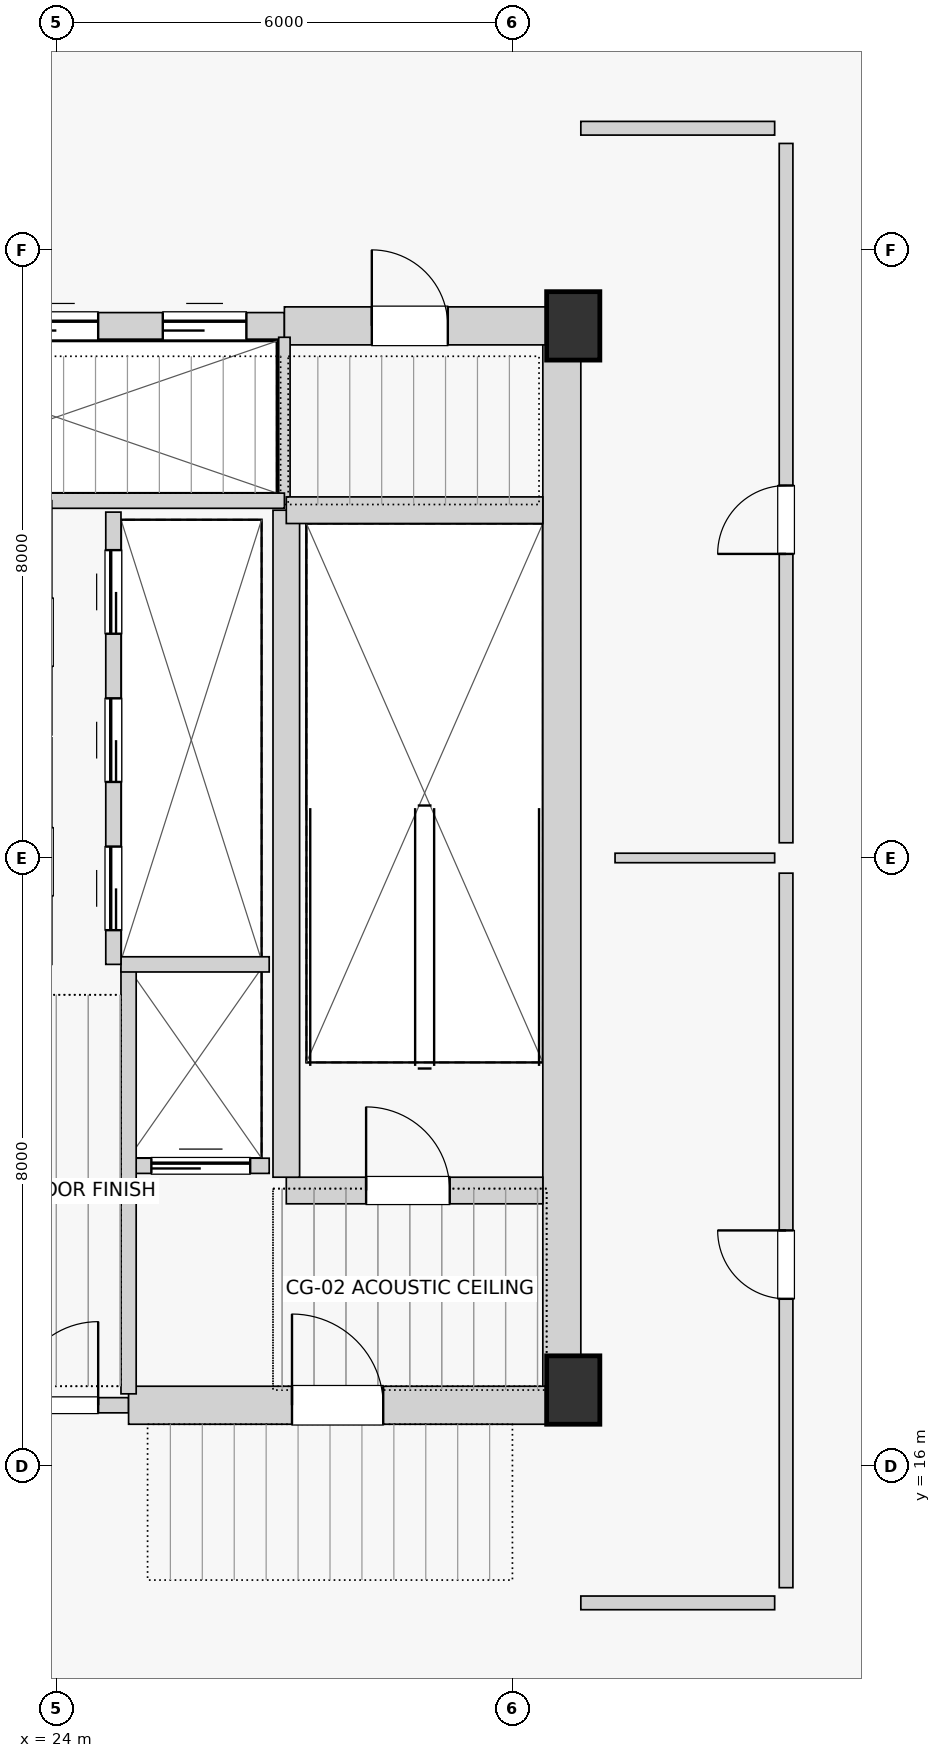
"""IFC4 building model, lengths in metres.
Left out: names, types, materials, properties, quantities, classifications, styles, units other than length and angle.
Written with IfcOpenShell. Run it as: python <this file> out.ifc"""

import sys

from ifc_helpers import new_model, si_unit, direction, frame, frame_2d, origin, origin_2d, place, context, subcontext, project, spatial, rectangle, extrude, source, transform, mapped, element, fill, save


model = new_model("IFC4")
c1 = context("Model", 3, precision=1e-05, world=origin(), true_north=direction((0.0, 1.0)))
c2 = subcontext(c1, "Body", "Model", "MODEL_VIEW")
j1 = project(units=[si_unit("LENGTHUNIT", "METRE"), si_unit("PLANEANGLEUNIT", "RADIAN")], contexts=[c1])
p1 = place(None, origin())
s1 = spatial("IfcSite", under=j1, at=p1, CompositionType="ELEMENT")
p2 = place(p1, origin())
s2 = spatial("IfcBuilding", under=s1, at=p2, CompositionType="ELEMENT")
p3 = place(p2, frame((0.0, 0.0, 174.35)))
s3 = spatial("IfcBuildingStorey", under=s2, at=p3, CompositionType="ELEMENT", Elevation=174.35)
for number, where, z_axis, x_axis in (
    (1, (30.8, 17.0, 0.0), (0.0, 0.0, 1.0), (1.0, 0.0, 0.0)),
    (2, (30.8, 31.0, 0.0), (0.0, 0.0, 1.0), (1.0, 0.0, 0.0)),
):
    element("IfcColumn", number, at=place(p3, frame(where, z_axis=z_axis, x_axis=x_axis)), inside=s3, PredefinedType="PILASTER", context=c2, shape_type="SweptSolid", body=[
        extrude(rectangle(XDim=0.7, YDim=0.9, at=origin_2d()), origin(), (0.0, 0.0, 1.0), 4.5),
    ])
p4 = place(p3, frame((30.65, 16.8, 0.0), z_axis=(0.0, 0.0, 1.0), x_axis=(0.0, 1.0, 0.0)))
e3 = element("IfcWall", 3, at=p4, inside=s3, PredefinedType="SHEAR", context=c2, shape_type="SweptSolid", body=[
    extrude(rectangle(XDim=14.2, YDim=0.5, at=frame_2d((7.1, 0.0))), origin(), (0.0, 0.0, 1.0), 4.265),
])
p5 = place(p3, frame((23.05, 16.8, 0.0), z_axis=(0.0, 0.0, 1.0), x_axis=(1.0, 0.0, 0.0)))
e4 = element("IfcWall", 4, at=p5, inside=s3, PredefinedType="SOLIDWALL", context=c2, shape_type="SweptSolid", body=[
    extrude(rectangle(XDim=1.9, YDim=0.2, at=frame_2d((0.95, 0.0))), origin(), (0.0, 0.0, 1.0), 3.415),
])
p6 = place(p5, frame((0.4, 0.0, 0.0)))
e5 = element("IfcOpeningElement", 5, at=p6, cuts=e4, PredefinedType="OPENING", context=c2, shape_type="SweptSolid", body=[
    extrude(rectangle(XDim=1.1, YDim=2.03, at=frame_2d((0.55, 1.015))), frame((0.0, 0.11, 0.0), z_axis=(0.0, -1.0, 0.0), x_axis=(1.0, 0.0, 0.0)), (0.0, 0.0, 1.0), 0.22),
])
p7 = place(p3, frame((24.95, 16.8, 0.0), z_axis=(0.0, 0.0, 1.0), x_axis=(1.0, 0.0, 0.0)))
e6 = element("IfcWall", 6, at=p7, inside=s3, PredefinedType="SHEAR", context=c2, shape_type="SweptSolid", body=[
    extrude(rectangle(XDim=5.85, YDim=0.5, at=frame_2d((2.925, 0.0))), origin(), (0.0, 0.0, 1.0), 4.265),
])
p8 = place(p7, frame((2.15, 0.0, 0.0)))
e7 = element("IfcOpeningElement", 7, at=p8, cuts=e6, PredefinedType="OPENING", context=c2, shape_type="SweptSolid", body=[
    extrude(rectangle(XDim=1.2, YDim=2.03, at=frame_2d((0.6, 1.015))), frame((0.0, 0.26, 0.0), z_axis=(0.0, -1.0, 0.0), x_axis=(1.0, 0.0, 0.0)), (0.0, 0.0, 1.0), 0.52),
])
p9 = place(p3, frame((21.0, 31.0, 0.0), z_axis=(0.0, 0.0, 1.0), x_axis=(1.0, 0.0, 0.0)))
e8 = element("IfcWall", 8, at=p9, inside=s3, PredefinedType="SHEAR", context=c2, shape_type="SweptSolid", body=[
    extrude(rectangle(XDim=6.0, YDim=0.35, at=frame_2d((3.0, 0.0))), origin(), (0.0, 0.0, 1.0), 4.265),
])
p10 = place(p9, frame((0.5, 0.0, 0.0)))
e9 = element("IfcOpeningElement", 9, at=p10, cuts=e8, PredefinedType="OPENING", context=c2, shape_type="SweptSolid", body=[
    extrude(rectangle(XDim=1.1, YDim=2.08, at=frame_2d((0.55, 1.04))), frame((0.0, 0.185, 0.0), z_axis=(0.0, -1.0, 0.0), x_axis=(1.0, 0.0, 0.0)), (0.0, 0.0, 1.0), 0.37),
])
p11 = place(p9, frame((2.45, 0.0, 0.0)))
e10 = element("IfcOpeningElement", 10, at=p11, cuts=e8, PredefinedType="OPENING", context=c2, shape_type="SweptSolid", body=[
    extrude(rectangle(XDim=1.1, YDim=2.08, at=frame_2d((0.55, 1.04))), frame((0.0, 0.185, 0.0), z_axis=(0.0, -1.0, 0.0), x_axis=(1.0, 0.0, 0.0)), (0.0, 0.0, 1.0), 0.37),
])
p12 = place(p9, frame((4.4, 0.0, 0.0)))
e11 = element("IfcOpeningElement", 11, at=p12, cuts=e8, PredefinedType="OPENING", context=c2, shape_type="SweptSolid", body=[
    extrude(rectangle(XDim=1.1, YDim=2.08, at=frame_2d((0.55, 1.04))), frame((0.0, 0.185, 0.0), z_axis=(0.0, -1.0, 0.0), x_axis=(1.0, 0.0, 0.0)), (0.0, 0.0, 1.0), 0.37),
])
p13 = place(p3, frame((27.0, 31.0, 0.0), z_axis=(0.0, 0.0, 1.0), x_axis=(1.0, 0.0, 0.0)))
e12 = element("IfcWall", 12, at=p13, inside=s3, PredefinedType="SHEAR", context=c2, shape_type="SweptSolid", body=[
    extrude(rectangle(XDim=3.8, YDim=0.5, at=frame_2d((1.9, 0.0))), origin(), (0.0, 0.0, 1.0), 4.265),
])
p14 = place(p13, frame((1.15, 0.0, 0.0)))
e13 = element("IfcOpeningElement", 13, at=p14, cuts=e12, PredefinedType="OPENING", context=c2, shape_type="SweptSolid", body=[
    extrude(rectangle(XDim=1.0, YDim=2.01, at=frame_2d((0.5, 1.005))), frame((0.0, 0.26, 0.0), z_axis=(0.0, -1.0, 0.0), x_axis=(1.0, 0.0, 0.0)), (0.0, 0.0, 1.0), 0.52),
])
p15 = place(p3, frame((27.0, 28.65, 0.0), z_axis=(0.0, 0.0, 1.0), x_axis=(0.0, 1.0, 0.0)))
e14 = element("IfcWall", 14, at=p15, inside=s3, PredefinedType="PARTITIONING", context=c2, shape_type="SweptSolid", body=[
    extrude(rectangle(XDim=2.2, YDim=0.15, at=frame_2d((1.1, 0.0))), origin(), (0.0, 0.0, 1.0), 4.265),
])
p16 = place(p3, frame((24.95, 19.95, 0.0), z_axis=(0.0, 0.0, 1.0), x_axis=(1.0, 0.0, 0.0)))
e15 = element("IfcWall", 15, at=p16, inside=s3, PredefinedType="SOLIDWALL", context=c2, shape_type="SweptSolid", body=[
    extrude(rectangle(XDim=1.85, YDim=0.2, at=frame_2d((0.925, 0.0))), origin(), (0.0, 0.0, 1.0), 4.265),
])
p17 = place(p16, frame((0.3, 0.0, 0.0)))
e16 = element("IfcOpeningElement", 16, at=p17, cuts=e15, PredefinedType="OPENING", context=c2, shape_type="SweptSolid", body=[
    extrude(rectangle(XDim=1.3, YDim=2.25, at=frame_2d((0.65, 1.125))), frame((0.0, 0.11, 0.0), z_axis=(0.0, -1.0, 0.0), x_axis=(1.0, 0.0, 0.0)), (0.0, 0.0, 1.0), 0.22),
])
p18 = place(p3, frame((27.025, 19.625, 0.0), z_axis=(0.0, 0.0, 1.0), x_axis=(1.0, 0.0, 0.0)))
e17 = element("IfcWall", 17, at=p18, inside=s3, PredefinedType="SHEAR", context=c2, shape_type="SweptSolid", body=[
    extrude(rectangle(XDim=3.375, YDim=0.35, at=frame_2d((1.688, 0.0))), origin(), (0.0, 0.0, 1.0), 4.265),
])
p19 = place(p18, frame((1.05, 0.0, 0.0)))
e18 = element("IfcOpeningElement", 18, at=p19, cuts=e17, PredefinedType="OPENING", context=c2, shape_type="SweptSolid", body=[
    extrude(rectangle(XDim=1.1, YDim=2.03, at=frame_2d((0.55, 1.015))), frame((0.0, 0.185, 0.0), z_axis=(0.0, -1.0, 0.0), x_axis=(1.0, 0.0, 0.0)), (0.0, 0.0, 1.0), 0.37),
])
p20 = place(p3, frame((27.025, 19.8, 0.0), z_axis=(0.0, 0.0, 1.0), x_axis=(0.0, 1.0, 0.0)))
e19 = element("IfcWall", 19, at=p20, inside=s3, PredefinedType="SHEAR", context=c2, shape_type="SweptSolid", body=[
    extrude(rectangle(XDim=8.775, YDim=0.35, at=frame_2d((4.387, 0.0))), origin(), (0.0, 0.0, 1.0), 4.265),
])
p21 = place(p3, frame((27.025, 28.575, 0.0), z_axis=(0.0, 0.0, 1.0), x_axis=(1.0, 0.0, 0.0)))
e20 = element("IfcWall", 20, at=p21, inside=s3, PredefinedType="SHEAR", context=c2, shape_type="SweptSolid", body=[
    extrude(rectangle(XDim=3.375, YDim=0.35, at=frame_2d((1.688, 0.0))), origin(), (0.0, 0.0, 1.0), 4.265),
])
p22 = place(p3, frame((24.95, 16.95, 0.0), z_axis=(0.0, 0.0, 1.0), x_axis=(0.0, 1.0, 0.0)))
e21 = element("IfcWall", 21, at=p22, inside=s3, PredefinedType="SOLIDWALL", context=c2, shape_type="SweptSolid", body=[
    extrude(rectangle(XDim=5.6, YDim=0.2, at=frame_2d((2.8, 0.0))), origin(), (0.0, 0.0, 1.0), 4.265),
])
p23 = place(p3, frame((24.85, 22.6, 0.0), z_axis=(0.0, 0.0, 1.0), x_axis=(1.0, 0.0, 0.0)))
e22 = element("IfcWall", 22, at=p23, inside=s3, PredefinedType="SOLIDWALL", context=c2, shape_type="SweptSolid", body=[
    extrude(rectangle(XDim=1.95, YDim=0.2, at=frame_2d((0.975, 0.0))), origin(), (0.0, 0.0, 1.0), 4.265),
])
p24 = place(p3, frame((21.0, 28.7, 0.0), z_axis=(0.0, 0.0, 1.0), x_axis=(1.0, 0.0, 0.0)))
e23 = element("IfcWall", 23, at=p24, inside=s3, PredefinedType="SOLIDWALL", context=c2, shape_type="SweptSolid", body=[
    extrude(rectangle(XDim=6.0, YDim=0.2, at=frame_2d((3.0, 0.0))), origin(), (0.0, 0.0, 1.0), 4.265),
])
p25 = place(p3, frame((24.75, 22.6, 0.0), z_axis=(0.0, 0.0, 1.0), x_axis=(0.0, 1.0, 0.0)))
e24 = element("IfcWall", 24, at=p25, inside=s3, PredefinedType="SOLIDWALL", context=c2, shape_type="SweptSolid", body=[
    extrude(rectangle(XDim=5.95, YDim=0.2, at=frame_2d((2.975, 0.0))), origin(), (0.0, 0.0, 1.0), 4.265),
])
p26 = place(p25, frame((0.45, 0.0, 0.0)))
e25 = element("IfcOpeningElement", 25, at=p26, cuts=e24, PredefinedType="OPENING", context=c2, shape_type="SweptSolid", body=[
    extrude(rectangle(XDim=1.1, YDim=2.08, at=frame_2d((0.55, 1.04))), frame((0.0, 0.11, 0.0), z_axis=(0.0, -1.0, 0.0), x_axis=(1.0, 0.0, 0.0)), (0.0, 0.0, 1.0), 0.22),
])
p27 = place(p25, frame((2.4, 0.0, 0.0)))
e26 = element("IfcOpeningElement", 26, at=p27, cuts=e24, PredefinedType="OPENING", context=c2, shape_type="SweptSolid", body=[
    extrude(rectangle(XDim=1.1, YDim=2.08, at=frame_2d((0.55, 1.04))), frame((0.0, 0.11, 0.0), z_axis=(0.0, -1.0, 0.0), x_axis=(1.0, 0.0, 0.0)), (0.0, 0.0, 1.0), 0.22),
])
p28 = place(p25, frame((4.35, 0.0, 0.0)))
e27 = element("IfcOpeningElement", 27, at=p28, cuts=e24, PredefinedType="OPENING", context=c2, shape_type="SweptSolid", body=[
    extrude(rectangle(XDim=1.1, YDim=2.08, at=frame_2d((0.55, 1.04))), frame((0.0, 0.11, 0.0), z_axis=(0.0, -1.0, 0.0), x_axis=(1.0, 0.0, 0.0)), (0.0, 0.0, 1.0), 0.22),
])
p29 = place(p3, frame((33.6, 14.4, 0.0), z_axis=(0.0, 0.0, 1.0), x_axis=(0.0, 1.0, 0.0)))
e28 = element("IfcWall", 28, at=p29, inside=s3, PredefinedType="PARTITIONING", context=c2, shape_type="SweptSolid", body=[
    extrude(rectangle(XDim=9.4, YDim=0.18, at=frame_2d((4.7, 0.0))), origin(), (0.0, 0.0, 1.0), 4.265),
])
p30 = place(p29, frame((3.8, 0.0, 0.0)))
e29 = element("IfcOpeningElement", 29, at=p30, cuts=e28, PredefinedType="OPENING", context=c2, shape_type="SweptSolid", body=[
    extrude(rectangle(XDim=0.9, YDim=2.01, at=frame_2d((0.45, 1.005))), frame((0.0, 0.1, 0.0), z_axis=(0.0, -1.0, 0.0), x_axis=(1.0, 0.0, 0.0)), (0.0, 0.0, 1.0), 0.2),
])
p31 = place(p3, frame((33.6, 24.2, 0.0), z_axis=(0.0, 0.0, 1.0), x_axis=(0.0, 1.0, 0.0)))
e30 = element("IfcWall", 30, at=p31, inside=s3, PredefinedType="PARTITIONING", context=c2, shape_type="SweptSolid", body=[
    extrude(rectangle(XDim=9.2, YDim=0.18, at=frame_2d((4.6, 0.0))), origin(), (0.0, 0.0, 1.0), 4.265),
])
p32 = place(p31, frame((3.8, 0.0, 0.0)))
e31 = element("IfcOpeningElement", 31, at=p32, cuts=e30, PredefinedType="OPENING", context=c2, shape_type="SweptSolid", body=[
    extrude(rectangle(XDim=0.9, YDim=2.01, at=frame_2d((0.45, 1.005))), frame((0.0, 0.1, 0.0), z_axis=(0.0, -1.0, 0.0), x_axis=(1.0, 0.0, 0.0)), (0.0, 0.0, 1.0), 0.2),
])
p33 = place(p3, frame((31.35, 24.0, 0.0), z_axis=(0.0, 0.0, 1.0), x_axis=(1.0, 0.0, 0.0)))
e32 = element("IfcWall", 32, at=p33, inside=s3, PredefinedType="PARTITIONING", context=c2, shape_type="SweptSolid", body=[
    extrude(rectangle(XDim=2.1, YDim=0.125, at=frame_2d((1.05, 0.0))), origin(), (0.0, 0.0, 1.0), 4.265),
])
for number, where, z_axis, x_axis in (
    (33, (30.9, 14.2, 0.0), (0.0, 0.0, 1.0), (1.0, 0.0, 0.0)),
    (34, (30.9, 33.6, 0.0), (0.0, 0.0, 1.0), (1.0, 0.0, 0.0)),
):
    element("IfcWall", number, at=place(p3, frame(where, z_axis=z_axis, x_axis=x_axis)), inside=s3, PredefinedType="PARTITIONING", context=c2, shape_type="SweptSolid", body=[
        extrude(rectangle(XDim=2.55, YDim=0.18, at=frame_2d((1.275, 0.0))), origin(), (0.0, 0.0, 1.0), 4.265),
    ])
m1 = source(origin(), c2, "Body", "SweptSolid", [
    extrude(rectangle(XDim=1.1, YDim=2.03, at=frame_2d((0.55, 1.015))), frame((0.0, 0.025, 0.0), z_axis=(0.0, -1.0, 0.0), x_axis=(1.0, 0.0, 0.0)), (0.0, 0.0, 1.0), 0.05),
])
p34 = place(p6, origin())
e35 = element("IfcDoor", 35, at=p34, inside=s3, OperationType="SINGLE_SWING_RIGHT", PredefinedType="DOOR", context=c2, shape_type="MappedRepresentation", body=[
    mapped(m1, transform((0.0, 0.0, 0.0), scale=1.0)),
])
fill(e5, e35)
m2 = source(origin(), c2, "Body", "SweptSolid", [
    extrude(rectangle(XDim=1.2, YDim=2.03, at=frame_2d((0.6, 1.015))), frame((0.0, 0.025, 0.0), z_axis=(0.0, -1.0, 0.0), x_axis=(1.0, 0.0, 0.0)), (0.0, 0.0, 1.0), 0.05),
])
p35 = place(p8, origin())
e36 = element("IfcDoor", 36, at=p35, inside=s3, OperationType="SINGLE_SWING_LEFT", PredefinedType="DOOR", context=c2, shape_type="MappedRepresentation", body=[
    mapped(m2, transform((0.0, 0.0, 0.0), scale=1.0)),
])
fill(e7, e36)
m3 = source(origin(), c2, "Body", "SweptSolid", [
    extrude(rectangle(XDim=1.1, YDim=2.08, at=frame_2d((0.55, 1.04))), frame((0.0, 0.025, 0.0), z_axis=(0.0, -1.0, 0.0), x_axis=(1.0, 0.0, 0.0)), (0.0, 0.0, 1.0), 0.05),
])
p36 = place(p11, origin())
e37 = element("IfcDoor", 37, at=p36, inside=s3, OperationType="SLIDING_TO_LEFT", PredefinedType="DOOR", context=c2, shape_type="MappedRepresentation", body=[
    mapped(m3, transform((0.0, 0.0, 0.0), scale=1.0)),
])
fill(e10, e37)
p37 = place(p12, origin())
e38 = element("IfcDoor", 38, at=p37, inside=s3, OperationType="SLIDING_TO_LEFT", PredefinedType="DOOR", context=c2, shape_type="MappedRepresentation", body=[
    mapped(m3, transform((0.0, 0.0, 0.0), scale=1.0)),
])
fill(e11, e38)
m4 = source(origin(), c2, "Body", "SweptSolid", [
    extrude(rectangle(XDim=1.0, YDim=2.01, at=frame_2d((0.5, 1.005))), frame((0.0, 0.025, 0.0), z_axis=(0.0, -1.0, 0.0), x_axis=(1.0, 0.0, 0.0)), (0.0, 0.0, 1.0), 0.05),
])
p38 = place(p14, origin())
e39 = element("IfcDoor", 39, at=p38, inside=s3, OperationType="SINGLE_SWING_LEFT", PredefinedType="DOOR", context=c2, shape_type="MappedRepresentation", body=[
    mapped(m4, transform((0.0, 0.0, 0.0), scale=1.0)),
])
fill(e13, e39)
m5 = source(origin(), c2, "Body", "SweptSolid", [
    extrude(rectangle(XDim=1.3, YDim=2.25, at=frame_2d((0.65, 1.125))), frame((0.0, 0.025, 0.0), z_axis=(0.0, -1.0, 0.0), x_axis=(1.0, 0.0, 0.0)), (0.0, 0.0, 1.0), 0.05),
])
p39 = place(p17, origin())
e40 = element("IfcDoor", 40, at=p39, inside=s3, OperationType="SLIDING_TO_LEFT", PredefinedType="DOOR", context=c2, shape_type="MappedRepresentation", body=[
    mapped(m5, transform((0.0, 0.0, 0.0), scale=1.0)),
])
fill(e16, e40)
p40 = place(p19, origin())
e41 = element("IfcDoor", 41, at=p40, inside=s3, OperationType="SINGLE_SWING_LEFT", PredefinedType="DOOR", context=c2, shape_type="MappedRepresentation", body=[
    mapped(m1, transform((0.0, 0.0, 0.0), scale=1.0)),
])
fill(e18, e41)
p41 = place(p26, origin())
e42 = element("IfcDoor", 42, at=p41, inside=s3, OperationType="SLIDING_TO_LEFT", PredefinedType="DOOR", context=c2, shape_type="MappedRepresentation", body=[
    mapped(m3, transform((0.0, 0.0, 0.0), scale=1.0)),
])
fill(e25, e42)
p42 = place(p27, origin())
e43 = element("IfcDoor", 43, at=p42, inside=s3, OperationType="SLIDING_TO_LEFT", PredefinedType="DOOR", context=c2, shape_type="MappedRepresentation", body=[
    mapped(m3, transform((0.0, 0.0, 0.0), scale=1.0)),
])
fill(e26, e43)
p43 = place(p28, origin())
e44 = element("IfcDoor", 44, at=p43, inside=s3, OperationType="SLIDING_TO_LEFT", PredefinedType="DOOR", context=c2, shape_type="MappedRepresentation", body=[
    mapped(m3, transform((0.0, 0.0, 0.0), scale=1.0)),
])
fill(e27, e44)
m6 = source(origin(), c2, "Body", "SweptSolid", [
    extrude(rectangle(XDim=0.9, YDim=2.01, at=frame_2d((0.45, 1.005))), frame((0.0, 0.025, 0.0), z_axis=(0.0, -1.0, 0.0), x_axis=(1.0, 0.0, 0.0)), (0.0, 0.0, 1.0), 0.05),
])
p44 = place(p30, origin())
e45 = element("IfcDoor", 45, at=p44, inside=s3, OperationType="SINGLE_SWING_RIGHT", PredefinedType="DOOR", context=c2, shape_type="MappedRepresentation", body=[
    mapped(m6, transform((0.0, 0.0, 0.0), scale=1.0)),
])
fill(e29, e45)
p45 = place(p32, origin())
e46 = element("IfcDoor", 46, at=p45, inside=s3, OperationType="SINGLE_SWING_LEFT", PredefinedType="DOOR", context=c2, shape_type="MappedRepresentation", body=[
    mapped(m6, transform((0.0, 0.0, 0.0), scale=1.0)),
])
fill(e31, e46)
save(model, sys.argv[1])
